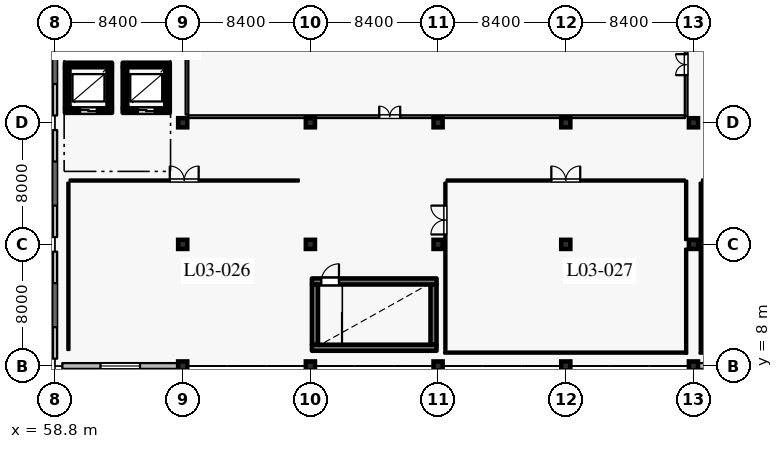
"""IFC4 building model, lengths in metres.
Left out: names, types, materials, properties, quantities, classifications, styles, units other than length and angle.
Written with IfcOpenShell. Run it as: python <this file> out.ifc"""

import sys

from ifc_helpers import new_model, si_unit, direction, frame, frame_2d, origin, origin_2d, place, context, subcontext, project, spatial, rectangle, extrude, element, fill, save


model = new_model("IFC4")
c1 = context("Model", 3, precision=1e-05, world=origin(), true_north=direction((0.0, 1.0)))
c2 = subcontext(c1, "Body", "Model", "MODEL_VIEW")
j1 = project(units=[si_unit("LENGTHUNIT", "METRE"), si_unit("PLANEANGLEUNIT", "RADIAN")], contexts=[c1])
p1 = place(None, origin())
s1 = spatial("IfcSite", under=j1, at=p1, CompositionType="ELEMENT")
p2 = place(p1, origin())
s2 = spatial("IfcBuilding", under=s1, at=p2, CompositionType="ELEMENT")
p3 = place(p2, frame((0.0, 0.0, 16.2)))
s3 = spatial("IfcBuildingStorey", under=s2, at=p3, CompositionType="ELEMENT", Elevation=16.2)
for number, where, z_axis, x_axis in (
    (1, (67.2, 8.0, 0.0), (0.0, 0.0, 1.0), (1.0, 0.0, 0.0)),
    (2, (67.2, 16.0, 0.0), (0.0, 0.0, 1.0), (1.0, 0.0, 0.0)),
    (3, (67.2, 24.0, 0.0), (0.0, 0.0, 1.0), (1.0, 0.0, 0.0)),
    (4, (75.6, 8.0, 0.0), (0.0, 0.0, 1.0), (1.0, 0.0, 0.0)),
    (5, (75.6, 16.0, 0.0), (0.0, 0.0, 1.0), (1.0, 0.0, 0.0)),
    (6, (75.6, 24.0, 0.0), (0.0, 0.0, 1.0), (1.0, 0.0, 0.0)),
    (7, (84.0, 8.0, 0.0), (0.0, 0.0, 1.0), (1.0, 0.0, 0.0)),
    (8, (84.0, 16.0, 0.0), (0.0, 0.0, 1.0), (1.0, 0.0, 0.0)),
    (9, (84.0, 24.0, 0.0), (0.0, 0.0, 1.0), (1.0, 0.0, 0.0)),
    (10, (92.4, 8.0, 0.0), (0.0, 0.0, 1.0), (1.0, 0.0, 0.0)),
    (11, (92.4, 16.0, 0.0), (0.0, 0.0, 1.0), (1.0, 0.0, 0.0)),
    (12, (92.4, 24.0, 0.0), (0.0, 0.0, 1.0), (1.0, 0.0, 0.0)),
    (13, (100.8, 8.0, 0.0), (0.0, 0.0, 1.0), (1.0, 0.0, 0.0)),
    (14, (100.8, 16.0, 0.0), (0.0, 0.0, 1.0), (1.0, 0.0, 0.0)),
    (15, (100.8, 24.0, 0.0), (0.0, 0.0, 1.0), (1.0, 0.0, 0.0)),
):
    element("IfcColumn", number, at=place(p3, frame(where, z_axis=z_axis, x_axis=x_axis)), inside=s3, PredefinedType="COLUMN", context=c2, shape_type="SweptSolid", body=[
        extrude(rectangle(XDim=0.6, YDim=0.6, at=origin_2d()), origin(), (0.0, 0.0, 1.0), 4.8),
    ])
p4 = place(p3, frame((108.9, 8.0, 0.0), z_axis=(0.0, 0.0, 1.0), x_axis=(-1.0, 0.0, 0.0)))
e16 = element("IfcWall", 16, at=p4, inside=s3, PredefinedType="SOLIDWALL", context=c2, shape_type="SweptSolid", body=[
    extrude(rectangle(XDim=7.8, YDim=0.38, at=frame_2d((3.9, 0.0))), origin(), (0.0, 0.0, 1.0), 3.84),
])
p5 = place(p4, frame((2.7, 0.0, 0.95)))
e17 = element("IfcOpeningElement", 17, at=p5, cuts=e16, PredefinedType="OPENING", context=c2, shape_type="SweptSolid", body=[
    extrude(rectangle(XDim=2.4, YDim=1.65, at=frame_2d((1.2, 0.825))), frame((0.0, 0.2, 0.0), z_axis=(0.0, -1.0, 0.0), x_axis=(1.0, 0.0, 0.0)), (0.0, 0.0, 1.0), 0.4),
])
p6 = place(p3, frame((66.9, 8.0, 0.0), z_axis=(0.0, 0.0, 1.0), x_axis=(-1.0, 0.0, 0.0)))
e18 = element("IfcWall", 18, at=p6, inside=s3, PredefinedType="SOLIDWALL", context=c2, shape_type="SweptSolid", body=[
    extrude(rectangle(XDim=7.62, YDim=0.38, at=frame_2d((3.81, 0.0))), origin(), (0.0, 0.0, 1.0), 4.5),
])
p7 = place(p6, frame((2.51, 0.0, 0.95)))
e19 = element("IfcOpeningElement", 19, at=p7, cuts=e18, PredefinedType="OPENING", context=c2, shape_type="SweptSolid", body=[
    extrude(rectangle(XDim=2.6, YDim=1.85, at=frame_2d((1.3, 0.925))), frame((0.0, 0.2, 0.0), z_axis=(0.0, -1.0, 0.0), x_axis=(1.0, 0.0, 0.0)), (0.0, 0.0, 1.0), 0.4),
])
p8 = place(p3, frame((58.8, 8.48, 0.0), z_axis=(0.0, 0.0, 1.0), x_axis=(0.0, 1.0, 0.0)))
e20 = element("IfcWall", 20, at=p8, inside=s3, PredefinedType="SOLIDWALL", context=c2, shape_type="SweptSolid", body=[
    extrude(rectangle(XDim=7.04, YDim=0.28, at=frame_2d((3.52, 0.0))), origin(), (0.0, 0.0, 1.0), 4.5),
])
p9 = place(p8, frame((2.07, 0.0, 0.95)))
e21 = element("IfcOpeningElement", 21, at=p9, cuts=e20, PredefinedType="OPENING", context=c2, shape_type="SweptSolid", body=[
    extrude(rectangle(XDim=2.9, YDim=1.75, at=frame_2d((1.45, 0.875))), frame((0.0, 0.15, 0.0), z_axis=(0.0, -1.0, 0.0), x_axis=(1.0, 0.0, 0.0)), (0.0, 0.0, 1.0), 0.3),
])
p10 = place(p3, frame((58.8, 16.48, 0.0), z_axis=(0.0, 0.0, 1.0), x_axis=(0.0, 1.0, 0.0)))
e22 = element("IfcWall", 22, at=p10, inside=s3, PredefinedType="SOLIDWALL", context=c2, shape_type="SweptSolid", body=[
    extrude(rectangle(XDim=7.04, YDim=0.28, at=frame_2d((3.52, 0.0))), origin(), (0.0, 0.0, 1.0), 4.5),
])
p11 = place(p10, frame((2.07, 0.0, 0.95)))
e23 = element("IfcOpeningElement", 23, at=p11, cuts=e22, PredefinedType="OPENING", context=c2, shape_type="SweptSolid", body=[
    extrude(rectangle(XDim=2.9, YDim=1.75, at=frame_2d((1.45, 0.875))), frame((0.0, 0.15, 0.0), z_axis=(0.0, -1.0, 0.0), x_axis=(1.0, 0.0, 0.0)), (0.0, 0.0, 1.0), 0.3),
])
p12 = place(p3, frame((58.8, 24.48, 0.0), z_axis=(0.0, 0.0, 1.0), x_axis=(0.0, 1.0, 0.0)))
e24 = element("IfcWall", 24, at=p12, inside=s3, PredefinedType="SOLIDWALL", context=c2, shape_type="SweptSolid", body=[
    extrude(rectangle(XDim=7.04, YDim=0.28, at=frame_2d((3.52, 0.0))), origin(), (0.0, 0.0, 1.0), 4.5),
])
p13 = place(p12, frame((2.07, 0.0, 0.95)))
e25 = element("IfcOpeningElement", 25, at=p13, cuts=e24, PredefinedType="OPENING", context=c2, shape_type="SweptSolid", body=[
    extrude(rectangle(XDim=2.9, YDim=1.75, at=frame_2d((1.45, 0.875))), frame((0.0, 0.15, 0.0), z_axis=(0.0, -1.0, 0.0), x_axis=(1.0, 0.0, 0.0)), (0.0, 0.0, 1.0), 0.3),
])
p14 = place(p3, frame((59.45, 24.8, 0.0), z_axis=(0.0, 0.0, 1.0), x_axis=(1.0, 0.0, 0.0)))
e26 = element("IfcWall", 26, at=p14, inside=s3, PredefinedType="SHEAR", context=c2, shape_type="SweptSolid", body=[
    extrude(rectangle(XDim=3.1, YDim=0.3, at=frame_2d((1.55, 0.0))), origin(), (0.0, 0.0, 1.0), 4.535),
])
p15 = place(p14, frame((1.0, 0.0, 0.0)))
e27 = element("IfcOpeningElement", 27, at=p15, cuts=e26, PredefinedType="OPENING", context=c2, shape_type="SweptSolid", body=[
    extrude(rectangle(XDim=1.1, YDim=2.2, at=frame_2d((0.55, 1.1))), frame((0.0, 0.16, 0.0), z_axis=(0.0, -1.0, 0.0), x_axis=(1.0, 0.0, 0.0)), (0.0, 0.0, 1.0), 0.32),
])
p16 = place(p3, frame((62.4, 24.955, 0.0), z_axis=(0.0, 0.0, 1.0), x_axis=(0.0, 1.0, 0.0)))
e28 = element("IfcWall", 28, at=p16, inside=s3, PredefinedType="SHEAR", context=c2, shape_type="SweptSolid", body=[
    extrude(rectangle(XDim=2.69, YDim=0.3, at=frame_2d((1.345, 0.0))), origin(), (0.0, 0.0, 1.0), 4.535),
])
p17 = place(p3, frame((62.55, 27.8, 0.0), z_axis=(0.0, 0.0, 1.0), x_axis=(-1.0, 0.0, 0.0)))
e29 = element("IfcWall", 29, at=p17, inside=s3, PredefinedType="SHEAR", context=c2, shape_type="SweptSolid", body=[
    extrude(rectangle(XDim=3.1, YDim=0.3, at=frame_2d((1.55, 0.0))), origin(), (0.0, 0.0, 1.0), 4.535),
])
p18 = place(p3, frame((59.6, 27.645, 0.0), z_axis=(0.0, 0.0, 1.0), x_axis=(0.0, -1.0, 0.0)))
e30 = element("IfcWall", 30, at=p18, inside=s3, PredefinedType="SHEAR", context=c2, shape_type="SweptSolid", body=[
    extrude(rectangle(XDim=2.69, YDim=0.3, at=frame_2d((1.345, 0.0))), origin(), (0.0, 0.0, 1.0), 4.535),
])
p19 = place(p3, frame((63.25, 24.8, 0.0), z_axis=(0.0, 0.0, 1.0), x_axis=(1.0, 0.0, 0.0)))
e31 = element("IfcWall", 31, at=p19, inside=s3, PredefinedType="SHEAR", context=c2, shape_type="SweptSolid", body=[
    extrude(rectangle(XDim=3.1, YDim=0.3, at=frame_2d((1.55, 0.0))), origin(), (0.0, 0.0, 1.0), 4.535),
])
p20 = place(p19, frame((1.0, 0.0, 0.0)))
e32 = element("IfcOpeningElement", 32, at=p20, cuts=e31, PredefinedType="OPENING", context=c2, shape_type="SweptSolid", body=[
    extrude(rectangle(XDim=1.1, YDim=2.2, at=frame_2d((0.55, 1.1))), frame((0.0, 0.16, 0.0), z_axis=(0.0, -1.0, 0.0), x_axis=(1.0, 0.0, 0.0)), (0.0, 0.0, 1.0), 0.32),
])
p21 = place(p3, frame((66.2, 24.955, 0.0), z_axis=(0.0, 0.0, 1.0), x_axis=(0.0, 1.0, 0.0)))
e33 = element("IfcWall", 33, at=p21, inside=s3, PredefinedType="SHEAR", context=c2, shape_type="SweptSolid", body=[
    extrude(rectangle(XDim=2.69, YDim=0.3, at=frame_2d((1.345, 0.0))), origin(), (0.0, 0.0, 1.0), 4.535),
])
p22 = place(p3, frame((66.35, 27.8, 0.0), z_axis=(0.0, 0.0, 1.0), x_axis=(-1.0, 0.0, 0.0)))
e34 = element("IfcWall", 34, at=p22, inside=s3, PredefinedType="SHEAR", context=c2, shape_type="SweptSolid", body=[
    extrude(rectangle(XDim=3.1, YDim=0.3, at=frame_2d((1.55, 0.0))), origin(), (0.0, 0.0, 1.0), 4.535),
])
p23 = place(p3, frame((63.4, 27.645, 0.0), z_axis=(0.0, 0.0, 1.0), x_axis=(0.0, -1.0, 0.0)))
e35 = element("IfcWall", 35, at=p23, inside=s3, PredefinedType="SHEAR", context=c2, shape_type="SweptSolid", body=[
    extrude(rectangle(XDim=2.69, YDim=0.3, at=frame_2d((1.345, 0.0))), origin(), (0.0, 0.0, 1.0), 4.535),
])
p24 = place(p3, frame((75.7, 9.2, 0.0), z_axis=(0.0, 0.0, 1.0), x_axis=(1.0, 0.0, 0.0)))
e36 = element("IfcWall", 36, at=p24, inside=s3, PredefinedType="SHEAR", context=c2, shape_type="SweptSolid", body=[
    extrude(rectangle(XDim=8.2, YDim=0.4, at=frame_2d((4.1, 0.0))), origin(), (0.0, 0.0, 1.0), 4.535),
])
p25 = place(p3, frame((83.7, 9.405, 0.0), z_axis=(0.0, 0.0, 1.0), x_axis=(0.0, 1.0, 0.0)))
e37 = element("IfcWall", 37, at=p25, inside=s3, PredefinedType="SHEAR", context=c2, shape_type="SweptSolid", body=[
    extrude(rectangle(XDim=3.95, YDim=0.4, at=frame_2d((1.975, 0.0))), origin(), (0.0, 0.0, 1.0), 4.535),
])
p26 = place(p3, frame((75.7, 13.56, 0.0), z_axis=(0.0, 0.0, 1.0), x_axis=(1.0, 0.0, 0.0)))
e38 = element("IfcWall", 38, at=p26, inside=s3, PredefinedType="SHEAR", context=c2, shape_type="SweptSolid", body=[
    extrude(rectangle(XDim=8.2, YDim=0.4, at=frame_2d((4.1, 0.0))), origin(), (0.0, 0.0, 1.0), 4.535),
])
p27 = place(p26, frame((0.62, 0.0, 0.0)))
e39 = element("IfcOpeningElement", 39, at=p27, cuts=e38, PredefinedType="OPENING", context=c2, shape_type="SweptSolid", body=[
    extrude(rectangle(XDim=1.16, YDim=2.2, at=frame_2d((0.58, 1.1))), frame((0.0, 0.21, 0.0), z_axis=(0.0, -1.0, 0.0), x_axis=(1.0, 0.0, 0.0)), (0.0, 0.0, 1.0), 0.42),
])
p28 = place(p3, frame((75.9, 9.405, 0.0), z_axis=(0.0, 0.0, 1.0), x_axis=(0.0, 1.0, 0.0)))
e40 = element("IfcWall", 40, at=p28, inside=s3, PredefinedType="SHEAR", context=c2, shape_type="SweptSolid", body=[
    extrude(rectangle(XDim=3.95, YDim=0.4, at=frame_2d((1.975, 0.0))), origin(), (0.0, 0.0, 1.0), 4.535),
])
p29 = place(p3, frame((59.76, 20.2, 0.0), z_axis=(0.0, 0.0, 1.0), x_axis=(1.0, 0.0, 0.0)))
e41 = element("IfcWall", 41, at=p29, inside=s3, PredefinedType="PARTITIONING", context=c2, shape_type="SweptSolid", body=[
    extrude(rectangle(XDim=15.08, YDim=0.14, at=frame_2d((7.54, 0.0))), origin(), (0.0, 0.0, 1.0), 4.535),
])
p30 = place(p29, frame((6.59, 0.0, 0.0)))
e42 = element("IfcOpeningElement", 42, at=p30, cuts=e41, PredefinedType="OPENING", context=c2, shape_type="SweptSolid", body=[
    extrude(rectangle(XDim=1.9, YDim=2.4, at=frame_2d((0.95, 1.2))), frame((0.0, 0.08, 0.0), z_axis=(0.0, -1.0, 0.0), x_axis=(1.0, 0.0, 0.0)), (0.0, 0.0, 1.0), 0.16),
])
p31 = place(p3, frame((59.68, 9.05, 0.0), z_axis=(0.0, 0.0, 1.0), x_axis=(0.0, 1.0, 0.0)))
e43 = element("IfcWall", 43, at=p31, inside=s3, PredefinedType="PARTITIONING", context=c2, shape_type="SweptSolid", body=[
    extrude(rectangle(XDim=11.01, YDim=0.14, at=frame_2d((5.505, 0.0))), origin(), (0.0, 0.0, 1.0), 4.535),
])
p32 = place(p3, frame((84.56, 20.2, 0.0), z_axis=(0.0, 0.0, 1.0), x_axis=(1.0, 0.0, 0.0)))
e44 = element("IfcWall", 44, at=p32, inside=s3, PredefinedType="PARTITIONING", context=c2, shape_type="SweptSolid", body=[
    extrude(rectangle(XDim=15.68, YDim=0.14, at=frame_2d((7.84, 0.0))), origin(), (0.0, 0.0, 1.0), 4.535),
])
p33 = place(p32, frame((6.89, 0.0, 0.0)))
e45 = element("IfcOpeningElement", 45, at=p33, cuts=e44, PredefinedType="OPENING", context=c2, shape_type="SweptSolid", body=[
    extrude(rectangle(XDim=1.9, YDim=2.4, at=frame_2d((0.95, 1.2))), frame((0.0, 0.08, 0.0), z_axis=(0.0, -1.0, 0.0), x_axis=(1.0, 0.0, 0.0)), (0.0, 0.0, 1.0), 0.16),
])
p34 = place(p3, frame((84.48, 9.05, 0.0), z_axis=(0.0, 0.0, 1.0), x_axis=(0.0, 1.0, 0.0)))
e46 = element("IfcWall", 46, at=p34, inside=s3, PredefinedType="PARTITIONING", context=c2, shape_type="SweptSolid", body=[
    extrude(rectangle(XDim=11.01, YDim=0.14, at=frame_2d((5.505, 0.0))), origin(), (0.0, 0.0, 1.0), 4.535),
])
p35 = place(p34, frame((7.6, 0.0, 0.0)))
e47 = element("IfcOpeningElement", 47, at=p35, cuts=e46, PredefinedType="OPENING", context=c2, shape_type="SweptSolid", body=[
    extrude(rectangle(XDim=1.9, YDim=2.4, at=frame_2d((0.95, 1.2))), frame((0.0, 0.08, 0.0), z_axis=(0.0, -1.0, 0.0), x_axis=(1.0, 0.0, 0.0)), (0.0, 0.0, 1.0), 0.16),
])
p36 = place(p3, frame((67.56, 24.4, 0.0), z_axis=(0.0, 0.0, 1.0), x_axis=(1.0, 0.0, 0.0)))
e48 = element("IfcWall", 48, at=p36, inside=s3, PredefinedType="PARTITIONING", context=c2, shape_type="SweptSolid", body=[
    extrude(rectangle(XDim=32.68, YDim=0.18, at=frame_2d((16.34, 0.0))), origin(), (0.0, 0.0, 1.0), 4.535),
])
p37 = place(p36, frame((12.568, 0.0, 0.0)))
e49 = element("IfcOpeningElement", 49, at=p37, cuts=e48, PredefinedType="OPENING", context=c2, shape_type="SweptSolid", body=[
    extrude(rectangle(XDim=1.38, YDim=2.3, at=frame_2d((0.69, 1.15))), frame((0.0, 0.1, 0.0), z_axis=(0.0, -1.0, 0.0), x_axis=(1.0, 0.0, 0.0)), (0.0, 0.0, 1.0), 0.2),
])
p38 = place(p3, frame((67.48, 24.54, 0.0), z_axis=(0.0, 0.0, 1.0), x_axis=(0.0, 1.0, 0.0)))
e50 = element("IfcWall", 50, at=p38, inside=s3, PredefinedType="PARTITIONING", context=c2, shape_type="SweptSolid", body=[
    extrude(rectangle(XDim=6.41, YDim=0.18, at=frame_2d((3.205, 0.0))), origin(), (0.0, 0.0, 1.0), 4.535),
])
p39 = place(p3, frame((101.36, 20.2, 0.0), z_axis=(0.0, 0.0, 1.0), x_axis=(1.0, 0.0, 0.0)))
e51 = element("IfcWall", 51, at=p39, inside=s3, PredefinedType="PARTITIONING", context=c2, shape_type="SweptSolid", body=[
    extrude(rectangle(XDim=15.28, YDim=0.14, at=frame_2d((7.64, 0.0))), origin(), (0.0, 0.0, 1.0), 4.535),
])
p40 = place(p39, frame((2.9, 0.0, 0.0)))
e52 = element("IfcOpeningElement", 52, at=p40, cuts=e51, PredefinedType="OPENING", context=c2, shape_type="SweptSolid", body=[
    extrude(rectangle(XDim=1.9, YDim=2.4, at=frame_2d((0.95, 1.2))), frame((0.0, 0.08, 0.0), z_axis=(0.0, -1.0, 0.0), x_axis=(1.0, 0.0, 0.0)), (0.0, 0.0, 1.0), 0.16),
])
p41 = place(p39, frame((10.5, 0.0, 0.0)))
e53 = element("IfcOpeningElement", 53, at=p41, cuts=e51, PredefinedType="OPENING", context=c2, shape_type="SweptSolid", body=[
    extrude(rectangle(XDim=1.9, YDim=2.4, at=frame_2d((0.95, 1.2))), frame((0.0, 0.08, 0.0), z_axis=(0.0, -1.0, 0.0), x_axis=(1.0, 0.0, 0.0)), (0.0, 0.0, 1.0), 0.16),
])
p42 = place(p3, frame((101.28, 9.05, 0.0), z_axis=(0.0, 0.0, 1.0), x_axis=(0.0, 1.0, 0.0)))
e54 = element("IfcWall", 54, at=p42, inside=s3, PredefinedType="PARTITIONING", context=c2, shape_type="SweptSolid", body=[
    extrude(rectangle(XDim=11.01, YDim=0.14, at=frame_2d((5.505, 0.0))), origin(), (0.0, 0.0, 1.0), 4.535),
])
p43 = place(p3, frame((100.32, 8.8, 0.0), z_axis=(0.0, 0.0, 1.0), x_axis=(0.0, 1.0, 0.0)))
e55 = element("IfcWall", 55, at=p43, inside=s3, PredefinedType="PARTITIONING", context=c2, shape_type="SweptSolid", body=[
    extrude(rectangle(XDim=6.921, YDim=0.14, at=frame_2d((3.46, 0.0))), origin(), (0.0, 0.0, 1.0), 4.535),
])
p44 = place(p3, frame((100.32, 16.279, 0.0), z_axis=(0.0, 0.0, 1.0), x_axis=(0.0, 1.0, 0.0)))
e56 = element("IfcWall", 56, at=p44, inside=s3, PredefinedType="PARTITIONING", context=c2, shape_type="SweptSolid", body=[
    extrude(rectangle(XDim=3.909, YDim=0.14, at=frame_2d((1.955, 0.0))), origin(), (0.0, 0.0, 1.0), 4.535),
])
p45 = place(p3, frame((84.4, 8.88, 0.0), z_axis=(0.0, 0.0, 1.0), x_axis=(1.0, 0.0, 0.0)))
e57 = element("IfcWall", 57, at=p45, inside=s3, PredefinedType="PARTITIONING", context=c2, shape_type="SweptSolid", body=[
    extrude(rectangle(XDim=15.85, YDim=0.14, at=frame_2d((7.925, 0.0))), origin(), (0.0, 0.0, 1.0), 4.535),
])
p46 = place(p3, frame((100.32, 24.432, 0.0), z_axis=(0.0, 0.0, 1.0), x_axis=(0.0, 1.0, 0.0)))
e58 = element("IfcWall", 58, at=p46, inside=s3, PredefinedType="PARTITIONING", context=c2, shape_type="SweptSolid", body=[
    extrude(rectangle(XDim=6.768, YDim=0.18, at=frame_2d((3.384, 0.0))), origin(), (0.0, 0.0, 1.0), 4.535),
])
p47 = place(p46, frame((2.7, 0.0, 0.0)))
e59 = element("IfcOpeningElement", 59, at=p47, cuts=e58, PredefinedType="OPENING", context=c2, shape_type="SweptSolid", body=[
    extrude(rectangle(XDim=1.38, YDim=2.3, at=frame_2d((0.69, 1.15))), frame((0.0, 0.1, 0.0), z_axis=(0.0, -1.0, 0.0), x_axis=(1.0, 0.0, 0.0)), (0.0, 0.0, 1.0), 0.2),
])
p48 = place(p3, frame((101.2, 8.88, 0.0), z_axis=(0.0, 0.0, 1.0), x_axis=(1.0, 0.0, 0.0)))
e60 = element("IfcWall", 60, at=p48, inside=s3, PredefinedType="PARTITIONING", context=c2, shape_type="SweptSolid", body=[
    extrude(rectangle(XDim=15.45, YDim=0.14, at=frame_2d((7.725, 0.0))), origin(), (0.0, 0.0, 1.0), 4.535),
])
p49 = place(p7, origin())
e61 = element("IfcWindow", 61, at=p49, inside=s3, PartitioningType="DOUBLE_PANEL_VERTICAL", PredefinedType="WINDOW", context=c2, shape_type="SweptSolid", body=[
    extrude(rectangle(XDim=2.6, YDim=1.85, at=frame_2d((1.3, 0.925))), frame((0.0, 0.03, 0.0), z_axis=(0.0, -1.0, 0.0), x_axis=(1.0, 0.0, 0.0)), (0.0, 0.0, 1.0), 0.06),
])
fill(e19, e61)
p50 = place(p9, origin())
e62 = element("IfcWindow", 62, at=p50, inside=s3, PartitioningType="DOUBLE_PANEL_VERTICAL", PredefinedType="WINDOW", context=c2, shape_type="SweptSolid", body=[
    extrude(rectangle(XDim=2.9, YDim=1.75, at=frame_2d((1.45, 0.875))), frame((0.0, 0.03, 0.0), z_axis=(0.0, -1.0, 0.0), x_axis=(1.0, 0.0, 0.0)), (0.0, 0.0, 1.0), 0.06),
])
fill(e21, e62)
p51 = place(p11, origin())
e63 = element("IfcWindow", 63, at=p51, inside=s3, PartitioningType="DOUBLE_PANEL_VERTICAL", PredefinedType="WINDOW", context=c2, shape_type="SweptSolid", body=[
    extrude(rectangle(XDim=2.9, YDim=1.75, at=frame_2d((1.45, 0.875))), frame((0.0, 0.03, 0.0), z_axis=(0.0, -1.0, 0.0), x_axis=(1.0, 0.0, 0.0)), (0.0, 0.0, 1.0), 0.06),
])
fill(e23, e63)
p52 = place(p13, origin())
e64 = element("IfcWindow", 64, at=p52, inside=s3, PartitioningType="DOUBLE_PANEL_VERTICAL", PredefinedType="WINDOW", context=c2, shape_type="SweptSolid", body=[
    extrude(rectangle(XDim=2.9, YDim=1.75, at=frame_2d((1.45, 0.875))), frame((0.0, 0.03, 0.0), z_axis=(0.0, -1.0, 0.0), x_axis=(1.0, 0.0, 0.0)), (0.0, 0.0, 1.0), 0.06),
])
fill(e25, e64)
p53 = place(p15, origin())
e65 = element("IfcDoor", 65, at=p53, inside=s3, OperationType="DOUBLE_DOOR_SLIDING", PredefinedType="DOOR", context=c2, shape_type="SweptSolid", body=[
    extrude(rectangle(XDim=1.1, YDim=2.2, at=frame_2d((0.55, 1.1))), frame((0.0, 0.025, 0.0), z_axis=(0.0, -1.0, 0.0), x_axis=(1.0, 0.0, 0.0)), (0.0, 0.0, 1.0), 0.05),
])
fill(e27, e65)
p54 = place(p20, origin())
e66 = element("IfcDoor", 66, at=p54, inside=s3, OperationType="DOUBLE_DOOR_SLIDING", PredefinedType="DOOR", context=c2, shape_type="SweptSolid", body=[
    extrude(rectangle(XDim=1.1, YDim=2.2, at=frame_2d((0.55, 1.1))), frame((0.0, 0.025, 0.0), z_axis=(0.0, -1.0, 0.0), x_axis=(1.0, 0.0, 0.0)), (0.0, 0.0, 1.0), 0.05),
])
fill(e32, e66)
p55 = place(p27, origin())
e67 = element("IfcDoor", 67, at=p55, inside=s3, OperationType="SINGLE_SWING_RIGHT", PredefinedType="DOOR", context=c2, shape_type="SweptSolid", body=[
    extrude(rectangle(XDim=1.16, YDim=2.2, at=frame_2d((0.58, 1.1))), frame((0.0, 0.025, 0.0), z_axis=(0.0, -1.0, 0.0), x_axis=(1.0, 0.0, 0.0)), (0.0, 0.0, 1.0), 0.05),
])
fill(e39, e67)
p56 = place(p30, origin())
e68 = element("IfcDoor", 68, at=p56, inside=s3, OperationType="DOUBLE_DOOR_SINGLE_SWING", PredefinedType="DOOR", context=c2, shape_type="SweptSolid", body=[
    extrude(rectangle(XDim=1.9, YDim=2.4, at=frame_2d((0.95, 1.2))), frame((0.0, 0.025, 0.0), z_axis=(0.0, -1.0, 0.0), x_axis=(1.0, 0.0, 0.0)), (0.0, 0.0, 1.0), 0.05),
])
fill(e42, e68)
p57 = place(p33, origin())
e69 = element("IfcDoor", 69, at=p57, inside=s3, OperationType="DOUBLE_DOOR_SINGLE_SWING", PredefinedType="DOOR", context=c2, shape_type="SweptSolid", body=[
    extrude(rectangle(XDim=1.9, YDim=2.4, at=frame_2d((0.95, 1.2))), frame((0.0, 0.025, 0.0), z_axis=(0.0, -1.0, 0.0), x_axis=(1.0, 0.0, 0.0)), (0.0, 0.0, 1.0), 0.05),
])
fill(e45, e69)
p58 = place(p37, origin())
e70 = element("IfcDoor", 70, at=p58, inside=s3, OperationType="DOUBLE_DOOR_SINGLE_SWING", PredefinedType="DOOR", context=c2, shape_type="SweptSolid", body=[
    extrude(rectangle(XDim=1.38, YDim=2.3, at=frame_2d((0.69, 1.15))), frame((0.0, 0.025, 0.0), z_axis=(0.0, -1.0, 0.0), x_axis=(1.0, 0.0, 0.0)), (0.0, 0.0, 1.0), 0.05),
])
fill(e49, e70)
p59 = place(p35, origin())
e71 = element("IfcDoor", 71, at=p59, inside=s3, OperationType="DOUBLE_DOOR_SINGLE_SWING", PredefinedType="DOOR", context=c2, shape_type="SweptSolid", body=[
    extrude(rectangle(XDim=1.9, YDim=2.4, at=frame_2d((0.95, 1.2))), frame((0.0, 0.025, 0.0), z_axis=(0.0, -1.0, 0.0), x_axis=(1.0, 0.0, 0.0)), (0.0, 0.0, 1.0), 0.05),
])
fill(e47, e71)
p60 = place(p47, origin())
e72 = element("IfcDoor", 72, at=p60, inside=s3, OperationType="DOUBLE_DOOR_SINGLE_SWING", PredefinedType="DOOR", context=c2, shape_type="SweptSolid", body=[
    extrude(rectangle(XDim=1.38, YDim=2.3, at=frame_2d((0.69, 1.15))), frame((0.0, 0.025, 0.0), z_axis=(0.0, -1.0, 0.0), x_axis=(1.0, 0.0, 0.0)), (0.0, 0.0, 1.0), 0.05),
])
fill(e59, e72)
save(model, sys.argv[1])
